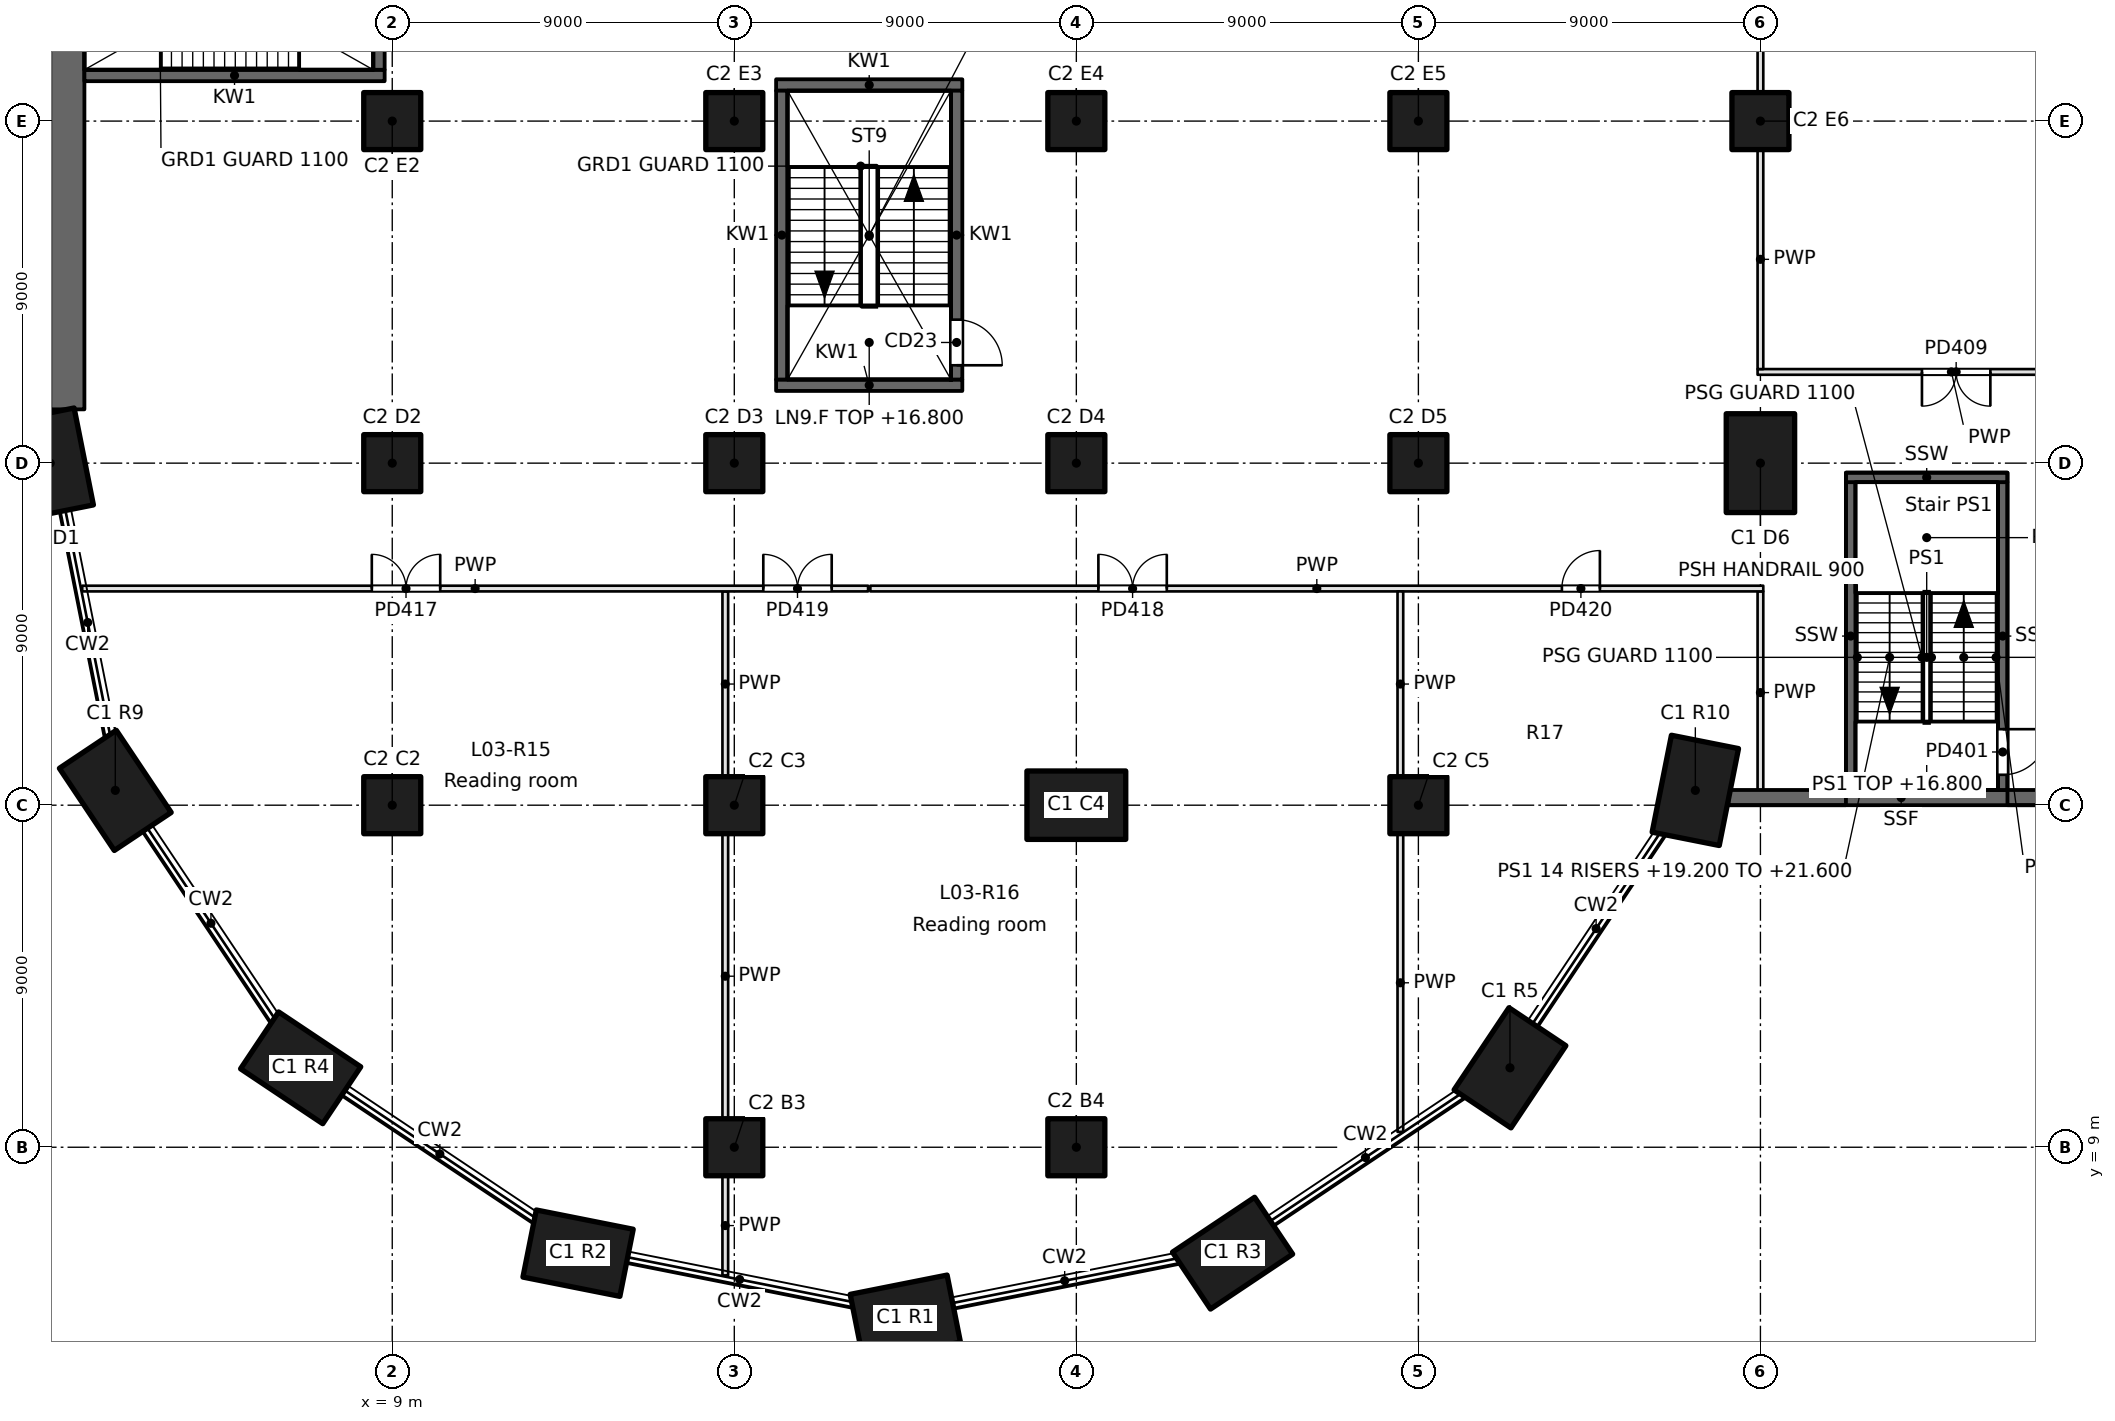
"""IFC4 building model, lengths in metres.
Left out: names, types, materials, properties, quantities, classifications, styles, units other than length and angle.
Written with IfcOpenShell. Run it as: python <this file> out.ifc"""

import sys

from ifc_helpers import new_model, si_unit, direction, frame, frame_2d, origin, origin_2d, place, context, subcontext, project, spatial, rectangle, extrude, element, fill, save


model = new_model("IFC4")
c1 = context("Model", 3, precision=1e-05, world=origin(), true_north=direction((0.0, 1.0)))
c2 = subcontext(c1, "Body", "Model", "MODEL_VIEW")
j1 = project(units=[si_unit("LENGTHUNIT", "METRE"), si_unit("PLANEANGLEUNIT", "RADIAN")], contexts=[c1])
p1 = place(None, origin())
s1 = spatial("IfcSite", under=j1, at=p1, CompositionType="ELEMENT")
p2 = place(p1, origin())
s2 = spatial("IfcBuilding", under=s1, at=p2, CompositionType="ELEMENT")
p3 = place(p2, frame((0.0, 0.0, 16.8)))
s3 = spatial("IfcBuildingStorey", under=s2, at=p3, CompositionType="ELEMENT", Elevation=16.8)
for number, where, z_axis, x_axis in (
    (1, (22.5, 4.5, 0.0), (0.0, 0.0, 1.0), (0.981, 0.195, 0.0)),
    (2, (13.89, 6.213, 0.0), (0.0, 0.0, 1.0), (-0.981, 0.195, 0.0)),
    (3, (31.11, 6.213, 0.0), (0.0, 0.0, 1.0), (0.831, 0.556, 0.0)),
    (4, (6.59, 11.09, 0.0), (0.0, 0.0, 1.0), (-0.831, 0.556, 0.0)),
    (5, (38.41, 11.09, 0.0), (0.0, 0.0, 1.0), (0.556, 0.831, 0.0)),
    (6, (1.713, 18.39, 0.0), (0.0, 0.0, 1.0), (-0.556, 0.831, 0.0)),
    (7, (43.287, 18.39, 0.0), (0.0, 0.0, 1.0), (0.195, 0.981, 0.0)),
    (8, (0.0, 27.0, 0.0), (0.0, 0.0, 1.0), (-0.195, 0.981, 0.0)),
    (9, (45.0, 27.0, 0.0), (0.0, 0.0, 1.0), (0.0, 1.0, 0.0)),
):
    element("IfcColumn", number, at=place(p3, frame(where, z_axis=z_axis, x_axis=x_axis)), inside=s3, PredefinedType="COLUMN", context=c2, shape_type="SweptSolid", body=[
        extrude(rectangle(XDim=2.6, YDim=1.8, at=origin_2d()), origin(), (0.0, 0.0, 1.0), 4.8),
    ])
for number, where, z_axis, x_axis in (
    (10, (45.0, 36.0, 0.0), (0.0, 0.0, 1.0), (1.0, 0.0, 0.0)),
    (11, (9.0, 18.0, 0.0), (0.0, 0.0, 1.0), (1.0, 0.0, 0.0)),
    (12, (9.0, 27.0, 0.0), (0.0, 0.0, 1.0), (1.0, 0.0, 0.0)),
    (13, (9.0, 36.0, 0.0), (0.0, 0.0, 1.0), (1.0, 0.0, 0.0)),
    (14, (18.0, 18.0, 0.0), (0.0, 0.0, 1.0), (1.0, 0.0, 0.0)),
    (15, (18.0, 27.0, 0.0), (0.0, 0.0, 1.0), (1.0, 0.0, 0.0)),
    (16, (18.0, 36.0, 0.0), (0.0, 0.0, 1.0), (1.0, 0.0, 0.0)),
):
    element("IfcColumn", number, at=place(p3, frame(where, z_axis=z_axis, x_axis=x_axis)), inside=s3, PredefinedType="COLUMN", context=c2, shape_type="SweptSolid", body=[
        extrude(rectangle(XDim=1.5, YDim=1.5, at=origin_2d()), origin(), (0.0, 0.0, 1.0), 4.8),
    ])
p4 = place(p3, frame((27.0, 18.0, 0.0), z_axis=(0.0, 0.0, 1.0), x_axis=(1.0, 0.0, 0.0)))
e17 = element("IfcColumn", 17, at=p4, inside=s3, PredefinedType="COLUMN", context=c2, shape_type="SweptSolid", body=[
    extrude(rectangle(XDim=2.6, YDim=1.8, at=origin_2d()), origin(), (0.0, 0.0, 1.0), 4.8),
])
for number, where, z_axis, x_axis in (
    (18, (27.0, 27.0, 0.0), (0.0, 0.0, 1.0), (1.0, 0.0, 0.0)),
    (19, (27.0, 36.0, 0.0), (0.0, 0.0, 1.0), (1.0, 0.0, 0.0)),
    (20, (36.0, 18.0, 0.0), (0.0, 0.0, 1.0), (1.0, 0.0, 0.0)),
    (21, (36.0, 27.0, 0.0), (0.0, 0.0, 1.0), (1.0, 0.0, 0.0)),
    (22, (36.0, 36.0, 0.0), (0.0, 0.0, 1.0), (1.0, 0.0, 0.0)),
    (23, (18.0, 9.0, 0.0), (0.0, 0.0, 1.0), (1.0, 0.0, 0.0)),
    (24, (27.0, 9.0, 0.0), (0.0, 0.0, 1.0), (1.0, 0.0, 0.0)),
):
    element("IfcColumn", number, at=place(p3, frame(where, z_axis=z_axis, x_axis=x_axis)), inside=s3, PredefinedType="COLUMN", context=c2, shape_type="SweptSolid", body=[
        extrude(rectangle(XDim=1.5, YDim=1.5, at=origin_2d()), origin(), (0.0, 0.0, 1.0), 4.8),
    ])
p5 = place(p3, frame((0.45, 94.5, 0.0), z_axis=(0.0, 0.0, 1.0), x_axis=(0.0, -1.0, 0.0)))
e25 = element("IfcWall", 25, at=p5, inside=s3, PredefinedType="SHEAR", context=c2, shape_type="SweptSolid", body=[
    extrude(rectangle(XDim=66.085, YDim=0.9, at=frame_2d((33.042, 0.0))), origin(), (0.0, 0.0, 1.0), 4.8),
])
for number, where, z_axis, x_axis in (
    (26, (19.1, 29.05, -0.35), (0.0, 0.0, 1.0), (1.0, 0.0, 0.0)),
    (27, (19.1, 36.95, -0.35), (0.0, 0.0, 1.0), (1.0, 0.0, 0.0)),
):
    element("IfcWall", number, at=place(p3, frame(where, z_axis=z_axis, x_axis=x_axis)), inside=s3, PredefinedType="SOLIDWALL", context=c2, shape_type="SweptSolid", body=[
        extrude(rectangle(XDim=4.9, YDim=0.3, at=frame_2d((2.45, 0.0))), origin(), (0.0, 0.0, 1.0), 4.8),
    ])
p6 = place(p3, frame((0.9, 37.2, -0.35), z_axis=(0.0, 0.0, 1.0), x_axis=(1.0, 0.0, 0.0)))
e28 = element("IfcWall", 28, at=p6, inside=s3, PredefinedType="SOLIDWALL", context=c2, shape_type="SweptSolid", body=[
    extrude(rectangle(XDim=7.9, YDim=0.3, at=frame_2d((3.95, 0.0))), origin(), (0.0, 0.0, 1.0), 4.8),
])
p7 = place(p3, frame((8.65, 37.35, -0.35), z_axis=(0.0, 0.0, 1.0), x_axis=(0.0, 1.0, 0.0)))
e29 = element("IfcWall", 29, at=p7, inside=s3, PredefinedType="SOLIDWALL", context=c2, shape_type="SweptSolid", body=[
    extrude(rectangle(XDim=4.3, YDim=0.3, at=frame_2d((2.15, 0.0))), origin(), (0.0, 0.0, 1.0), 4.8),
])
p8 = place(p3, frame((19.25, 29.2, -0.35), z_axis=(0.0, 0.0, 1.0), x_axis=(0.0, 1.0, 0.0)))
e30 = element("IfcWall", 30, at=p8, inside=s3, PredefinedType="SOLIDWALL", context=c2, shape_type="SweptSolid", body=[
    extrude(rectangle(XDim=7.6, YDim=0.3, at=frame_2d((3.8, 0.0))), origin(), (0.0, 0.0, 1.0), 4.8),
])
p9 = place(p3, frame((23.85, 29.2, -0.35), z_axis=(0.0, 0.0, 1.0), x_axis=(0.0, 1.0, 0.0)))
e31 = element("IfcWall", 31, at=p9, inside=s3, PredefinedType="SOLIDWALL", context=c2, shape_type="SweptSolid", body=[
    extrude(rectangle(XDim=7.6, YDim=0.3, at=frame_2d((3.8, 0.0))), origin(), (0.0, 0.0, 1.0), 4.8),
])
p10 = place(p9, frame((0.375, 0.0, 0.35)))
e32 = element("IfcOpeningElement", 32, at=p10, cuts=e31, PredefinedType="OPENING", context=c2, shape_type="SweptSolid", body=[
    extrude(rectangle(XDim=1.2, YDim=2.1, at=frame_2d((0.6, 1.05))), frame((0.0, 0.15, 0.0), z_axis=(0.0, -1.0, 0.0), x_axis=(1.0, 0.0, 0.0)), (0.0, 0.0, 1.0), 0.3),
])
p11 = place(p3, frame((47.375, 18.4, 0.0), z_axis=(0.0, 0.0, 1.0), x_axis=(0.0, 1.0, 0.0)))
e33 = element("IfcWall", 33, at=p11, inside=s3, PredefinedType="SOLIDWALL", context=c2, shape_type="SweptSolid", body=[
    extrude(rectangle(XDim=8.1, YDim=0.25, at=frame_2d((4.05, 0.0))), origin(), (0.0, 0.0, 1.0), 4.8),
])
p12 = place(p3, frame((51.375, 26.5, 0.0), z_axis=(0.0, 0.0, 1.0), x_axis=(0.0, -1.0, 0.0)))
e34 = element("IfcWall", 34, at=p12, inside=s3, PredefinedType="SOLIDWALL", context=c2, shape_type="SweptSolid", body=[
    extrude(rectangle(XDim=8.1, YDim=0.25, at=frame_2d((4.05, 0.0))), origin(), (0.0, 0.0, 1.0), 4.8),
])
p13 = place(p12, frame((6.5, 0.0, 0.0)))
e35 = element("IfcOpeningElement", 35, at=p13, cuts=e34, PredefinedType="OPENING", context=c2, shape_type="SweptSolid", body=[
    extrude(rectangle(XDim=1.2, YDim=2.1, at=frame_2d((0.6, 1.05))), frame((0.0, 0.125, 0.0), z_axis=(0.0, -1.0, 0.0), x_axis=(1.0, 0.0, 0.0)), (0.0, 0.0, 1.0), 0.25),
])
p14 = place(p3, frame((47.25, 26.625, 0.0), z_axis=(0.0, 0.0, 1.0), x_axis=(1.0, 0.0, 0.0)))
e36 = element("IfcWall", 36, at=p14, inside=s3, PredefinedType="SOLIDWALL", context=c2, shape_type="SweptSolid", body=[
    extrude(rectangle(XDim=4.25, YDim=0.25, at=frame_2d((2.125, 0.0))), origin(), (0.0, 0.0, 1.0), 4.8),
])
p15 = place(p3, frame((53.25, 18.2, 0.0), z_axis=(0.0, 0.0, 1.0), x_axis=(-1.0, 0.0, 0.0)))
e37 = element("IfcWall", 37, at=p15, inside=s3, PredefinedType="SOLIDWALL", context=c2, shape_type="SweptSolid", body=[
    extrude(rectangle(XDim=9.093, YDim=0.4, at=frame_2d((4.546, 0.0))), origin(), (0.0, 0.0, 1.0), 4.45),
])
p16 = place(p3, frame((55.125, 29.4, 0.0), z_axis=(0.0, 0.0, 1.0), x_axis=(-1.0, 0.0, 0.0)))
e38 = element("IfcWall", 38, at=p16, inside=s3, PredefinedType="PARTITIONING", context=c2, shape_type="SweptSolid", body=[
    extrude(rectangle(XDim=10.2, YDim=0.15, at=frame_2d((5.1, 0.0))), origin(), (0.0, 0.0, 1.0), 4.45),
])
p17 = place(p16, frame((4.075, 0.0, 0.0)))
e39 = element("IfcOpeningElement", 39, at=p17, cuts=e38, PredefinedType="OPENING", context=c2, shape_type="SweptSolid", body=[
    extrude(rectangle(XDim=1.8, YDim=2.1, at=frame_2d((0.9, 1.05))), frame((0.0, 0.075, 0.0), z_axis=(0.0, -1.0, 0.0), x_axis=(1.0, 0.0, 0.0)), (0.0, 0.0, 1.0), 0.15),
])
p18 = place(p3, frame((45.0, 23.625, 0.0), z_axis=(0.0, 0.0, 1.0), x_axis=(0.0, -1.0, 0.0)))
e40 = element("IfcWall", 40, at=p18, inside=s3, PredefinedType="PARTITIONING", context=c2, shape_type="SweptSolid", body=[
    extrude(rectangle(XDim=5.325, YDim=0.15, at=frame_2d((2.663, 0.0))), origin(), (0.0, 0.0, 1.0), 4.45),
])
p19 = place(p3, frame((45.0, 29.475, 0.0), z_axis=(0.0, 0.0, 1.0), x_axis=(0.0, 1.0, 0.0)))
e41 = element("IfcWall", 41, at=p19, inside=s3, PredefinedType="PARTITIONING", context=c2, shape_type="SweptSolid", body=[
    extrude(rectangle(XDim=5.775, YDim=0.15, at=frame_2d((2.887, 0.0))), origin(), (0.0, 0.0, 1.0), 4.45),
])
p20 = place(p3, frame((45.0, 36.75, 0.0), z_axis=(0.0, 0.0, 1.0), x_axis=(0.0, 1.0, 0.0)))
e42 = element("IfcWall", 42, at=p20, inside=s3, PredefinedType="PARTITIONING", context=c2, shape_type="SweptSolid", body=[
    extrude(rectangle(XDim=7.5, YDim=0.15, at=frame_2d((3.75, 0.0))), origin(), (0.0, 0.0, 1.0), 4.45),
])
p21 = place(p20, frame((2.75, 0.0, 0.0)))
e43 = element("IfcOpeningElement", 43, at=p21, cuts=e42, PredefinedType="OPENING", context=c2, shape_type="SweptSolid", body=[
    extrude(rectangle(XDim=1.8, YDim=2.1, at=frame_2d((0.9, 1.05))), frame((0.0, 0.075, 0.0), z_axis=(0.0, -1.0, 0.0), x_axis=(1.0, 0.0, 0.0)), (0.0, 0.0, 1.0), 0.15),
])
p22 = place(p3, frame((17.763, 5.628, 0.0), z_axis=(0.0, 0.0, 1.0), x_axis=(0.0, 1.0, 0.0)))
e44 = element("IfcWall", 44, at=p22, inside=s3, PredefinedType="PARTITIONING", context=c2, shape_type="SweptSolid", body=[
    extrude(rectangle(XDim=2.622, YDim=0.15, at=frame_2d((1.311, 0.0))), origin(), (0.0, 0.0, 1.0), 4.45),
])
p23 = place(p3, frame((17.763, 9.75, 0.0), z_axis=(0.0, 0.0, 1.0), x_axis=(0.0, 1.0, 0.0)))
e45 = element("IfcWall", 45, at=p23, inside=s3, PredefinedType="PARTITIONING", context=c2, shape_type="SweptSolid", body=[
    extrude(rectangle(XDim=7.5, YDim=0.15, at=frame_2d((3.75, 0.0))), origin(), (0.0, 0.0, 1.0), 4.45),
])
p24 = place(p3, frame((17.763, 18.75, 0.0), z_axis=(0.0, 0.0, 1.0), x_axis=(0.0, 1.0, 0.0)))
e46 = element("IfcWall", 46, at=p24, inside=s3, PredefinedType="PARTITIONING", context=c2, shape_type="SweptSolid", body=[
    extrude(rectangle(XDim=4.875, YDim=0.15, at=frame_2d((2.438, 0.0))), origin(), (0.0, 0.0, 1.0), 4.45),
])
p25 = place(p3, frame((0.842, 23.7, 0.0), z_axis=(0.0, 0.0, 1.0), x_axis=(1.0, 0.0, 0.0)))
e47 = element("IfcWall", 47, at=p25, inside=s3, PredefinedType="PARTITIONING", context=c2, shape_type="SweptSolid", body=[
    extrude(rectangle(XDim=20.678, YDim=0.15, at=frame_2d((10.339, 0.0))), origin(), (0.0, 0.0, 1.0), 4.45),
])
p26 = place(p25, frame((7.62, 0.0, 0.0)))
e48 = element("IfcOpeningElement", 48, at=p26, cuts=e47, PredefinedType="OPENING", context=c2, shape_type="SweptSolid", body=[
    extrude(rectangle(XDim=1.8, YDim=2.1, at=frame_2d((0.9, 1.05))), frame((0.0, 0.075, 0.0), z_axis=(0.0, -1.0, 0.0), x_axis=(1.0, 0.0, 0.0)), (0.0, 0.0, 1.0), 0.15),
])
p27 = place(p25, frame((17.921, 0.0, 0.0)))
e49 = element("IfcOpeningElement", 49, at=p27, cuts=e47, PredefinedType="OPENING", context=c2, shape_type="SweptSolid", body=[
    extrude(rectangle(XDim=1.8, YDim=2.1, at=frame_2d((0.9, 1.05))), frame((0.0, 0.075, 0.0), z_axis=(0.0, -1.0, 0.0), x_axis=(1.0, 0.0, 0.0)), (0.0, 0.0, 1.0), 0.15),
])
p28 = place(p3, frame((21.58, 23.7, 0.0), z_axis=(0.0, 0.0, 1.0), x_axis=(1.0, 0.0, 0.0)))
e50 = element("IfcWall", 50, at=p28, inside=s3, PredefinedType="PARTITIONING", context=c2, shape_type="SweptSolid", body=[
    extrude(rectangle(XDim=23.495, YDim=0.15, at=frame_2d((11.748, 0.0))), origin(), (0.0, 0.0, 1.0), 4.45),
])
p29 = place(p28, frame((6.0, 0.0, 0.0)))
e51 = element("IfcOpeningElement", 51, at=p29, cuts=e50, PredefinedType="OPENING", context=c2, shape_type="SweptSolid", body=[
    extrude(rectangle(XDim=1.8, YDim=2.1, at=frame_2d((0.9, 1.05))), frame((0.0, 0.075, 0.0), z_axis=(0.0, -1.0, 0.0), x_axis=(1.0, 0.0, 0.0)), (0.0, 0.0, 1.0), 0.15),
])
p30 = place(p28, frame((18.196, 0.0, 0.0)))
e52 = element("IfcOpeningElement", 52, at=p30, cuts=e50, PredefinedType="OPENING", context=c2, shape_type="SweptSolid", body=[
    extrude(rectangle(XDim=1.0, YDim=2.1, at=frame_2d((0.5, 1.05))), frame((0.0, 0.075, 0.0), z_axis=(0.0, -1.0, 0.0), x_axis=(1.0, 0.0, 0.0)), (0.0, 0.0, 1.0), 0.15),
])
p31 = place(p3, frame((35.526, 9.404, 0.0), z_axis=(0.0, 0.0, 1.0), x_axis=(0.0, 1.0, 0.0)))
e53 = element("IfcWall", 53, at=p31, inside=s3, PredefinedType="PARTITIONING", context=c2, shape_type="SweptSolid", body=[
    extrude(rectangle(XDim=7.846, YDim=0.15, at=frame_2d((3.923, 0.0))), origin(), (0.0, 0.0, 1.0), 4.45),
])
p32 = place(p3, frame((35.526, 18.75, 0.0), z_axis=(0.0, 0.0, 1.0), x_axis=(0.0, 1.0, 0.0)))
e54 = element("IfcWall", 54, at=p32, inside=s3, PredefinedType="PARTITIONING", context=c2, shape_type="SweptSolid", body=[
    extrude(rectangle(XDim=4.875, YDim=0.15, at=frame_2d((2.438, 0.0))), origin(), (0.0, 0.0, 1.0), 4.45),
])
p33 = place(p10, frame((1.2, 0.0, 0.0), z_axis=(0.0, 0.0, 1.0), x_axis=(-1.0, 0.0, 0.0)))
e55 = element("IfcDoor", 55, at=p33, inside=s3, OperationType="SINGLE_SWING_RIGHT", PredefinedType="DOOR", context=c2, shape_type="SweptSolid", body=[
    extrude(rectangle(XDim=1.2, YDim=2.1, at=frame_2d((0.6, 1.05))), frame((0.0, 0.025, 0.0), z_axis=(0.0, -1.0, 0.0), x_axis=(1.0, 0.0, 0.0)), (0.0, 0.0, 1.0), 0.05),
])
fill(e32, e55)
p34 = place(p13, origin())
e56 = element("IfcDoor", 56, at=p34, inside=s3, OperationType="SINGLE_SWING_LEFT", PredefinedType="DOOR", context=c2, shape_type="SweptSolid", body=[
    extrude(rectangle(XDim=1.2, YDim=2.1, at=frame_2d((0.6, 1.05))), frame((0.0, 0.025, 0.0), z_axis=(0.0, -1.0, 0.0), x_axis=(1.0, 0.0, 0.0)), (0.0, 0.0, 1.0), 0.05),
])
fill(e35, e56)
p35 = place(p17, origin())
e57 = element("IfcDoor", 57, at=p35, inside=s3, OperationType="DOUBLE_DOOR_SINGLE_SWING", PredefinedType="DOOR", context=c2, shape_type="SweptSolid", body=[
    extrude(rectangle(XDim=1.8, YDim=2.1, at=frame_2d((0.9, 1.05))), frame((0.0, 0.025, 0.0), z_axis=(0.0, -1.0, 0.0), x_axis=(1.0, 0.0, 0.0)), (0.0, 0.0, 1.0), 0.05),
])
fill(e39, e57)
p36 = place(p26, origin())
e58 = element("IfcDoor", 58, at=p36, inside=s3, OperationType="DOUBLE_DOOR_SINGLE_SWING", PredefinedType="DOOR", context=c2, shape_type="SweptSolid", body=[
    extrude(rectangle(XDim=1.8, YDim=2.1, at=frame_2d((0.9, 1.05))), frame((0.0, 0.025, 0.0), z_axis=(0.0, -1.0, 0.0), x_axis=(1.0, 0.0, 0.0)), (0.0, 0.0, 1.0), 0.05),
])
fill(e48, e58)
p37 = place(p29, origin())
e59 = element("IfcDoor", 59, at=p37, inside=s3, OperationType="DOUBLE_DOOR_SINGLE_SWING", PredefinedType="DOOR", context=c2, shape_type="SweptSolid", body=[
    extrude(rectangle(XDim=1.8, YDim=2.1, at=frame_2d((0.9, 1.05))), frame((0.0, 0.025, 0.0), z_axis=(0.0, -1.0, 0.0), x_axis=(1.0, 0.0, 0.0)), (0.0, 0.0, 1.0), 0.05),
])
fill(e51, e59)
p38 = place(p27, origin())
e60 = element("IfcDoor", 60, at=p38, inside=s3, OperationType="DOUBLE_DOOR_SINGLE_SWING", PredefinedType="DOOR", context=c2, shape_type="SweptSolid", body=[
    extrude(rectangle(XDim=1.8, YDim=2.1, at=frame_2d((0.9, 1.05))), frame((0.0, 0.025, 0.0), z_axis=(0.0, -1.0, 0.0), x_axis=(1.0, 0.0, 0.0)), (0.0, 0.0, 1.0), 0.05),
])
fill(e49, e60)
p39 = place(p30, origin())
e61 = element("IfcDoor", 61, at=p39, inside=s3, OperationType="SINGLE_SWING_RIGHT", PredefinedType="DOOR", context=c2, shape_type="SweptSolid", body=[
    extrude(rectangle(XDim=1.0, YDim=2.1, at=frame_2d((0.5, 1.05))), frame((0.0, 0.025, 0.0), z_axis=(0.0, -1.0, 0.0), x_axis=(1.0, 0.0, 0.0)), (0.0, 0.0, 1.0), 0.05),
])
fill(e52, e61)
save(model, sys.argv[1])
